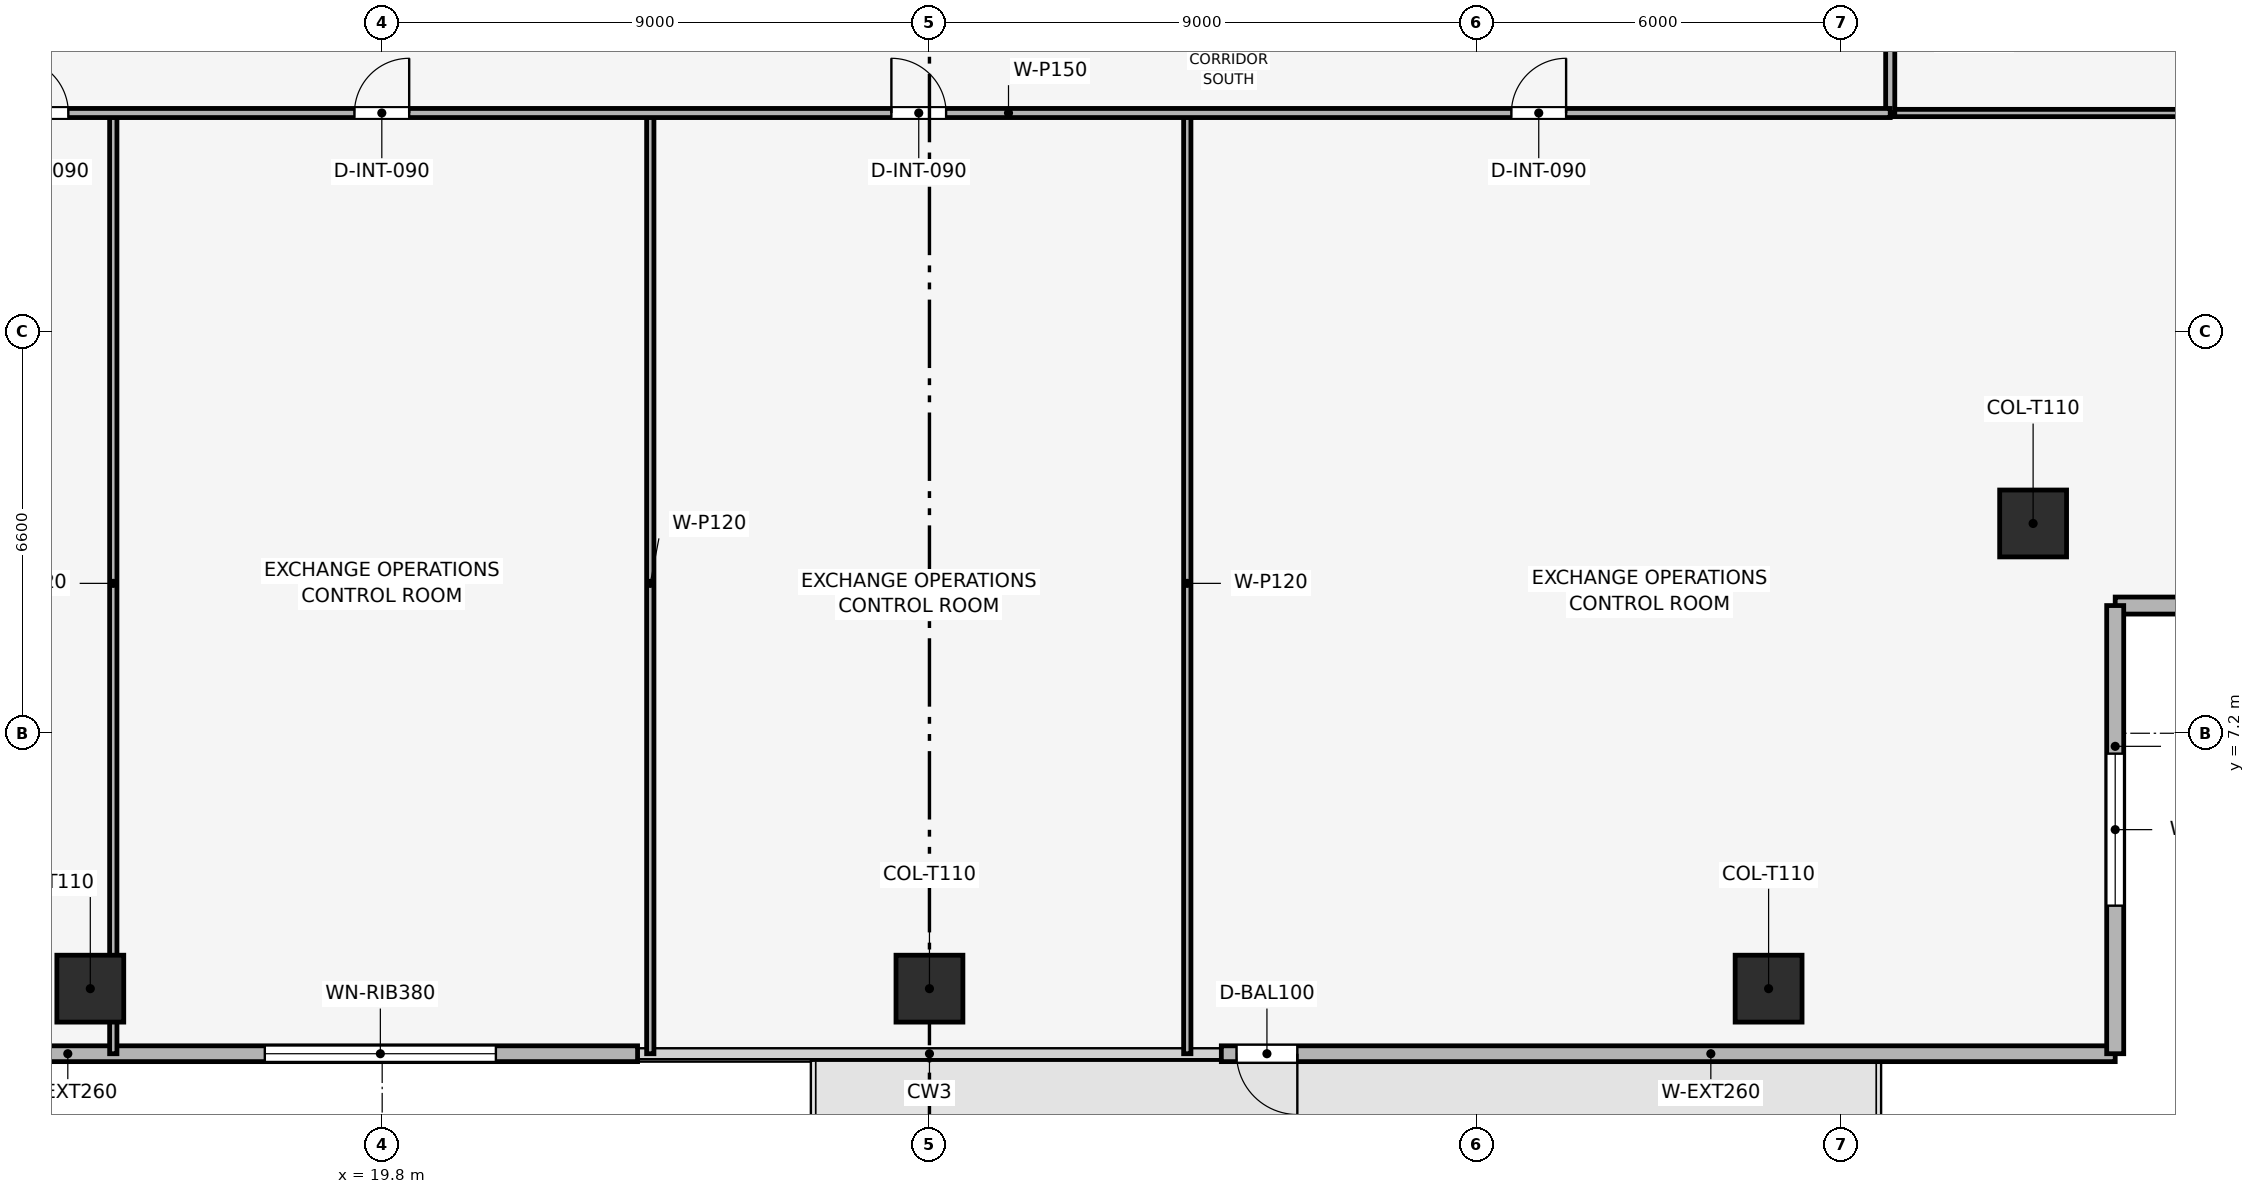
"""IFC4 building model, lengths in metres.
Left out: names, types, materials, properties, quantities, classifications, styles, units other than length and angle.
Written with IfcOpenShell. Run it as: python <this file> out.ifc"""

import sys

from ifc_helpers import new_model, si_unit, direction, frame, frame_2d, origin, origin_2d, place, context, subcontext, project, spatial, rectangle, extrude, element, fill, save


model = new_model("IFC4")
c1 = context("Model", 3, precision=1e-05, world=origin(), true_north=direction((0.0, 1.0)))
c2 = subcontext(c1, "Body", "Model", "MODEL_VIEW")
j1 = project(units=[si_unit("LENGTHUNIT", "METRE"), si_unit("PLANEANGLEUNIT", "RADIAN")], contexts=[c1])
p1 = place(None, origin())
s1 = spatial("IfcSite", under=j1, at=p1, CompositionType="ELEMENT")
p2 = place(p1, origin())
s2 = spatial("IfcBuilding", under=s1, at=p2, CompositionType="ELEMENT")
p3 = place(p2, frame((0.0, 0.0, 203.7)))
s3 = spatial("IfcBuildingStorey", under=s2, at=p3, CompositionType="ELEMENT", Elevation=203.7)
for number, where, z_axis, x_axis in (
    (1, (15.0, 3.0, 0.003), (0.0, 0.0, 1.0), (1.0, 0.0, 0.0)),
    (2, (28.8, 3.0, 0.003), (0.0, 0.0, 1.0), (1.0, 0.0, 0.0)),
    (3, (42.6, 3.0, 0.003), (0.0, 0.0, 1.0), (1.0, 0.0, 0.0)),
    (4, (46.95, 10.65, 0.003), (0.0, 0.0, 1.0), (1.0, 0.0, 0.0)),
):
    element("IfcColumn", number, at=place(p3, frame(where, z_axis=z_axis, x_axis=x_axis)), inside=s3, PredefinedType="COLUMN", context=c2, shape_type="SweptSolid", body=[
        extrude(rectangle(XDim=1.1, YDim=1.1, at=origin_2d()), origin(), (0.0, 0.0, 1.0), 3.494),
    ])
p4 = place(p3, frame((48.3, 1.93, 0.0), z_axis=(0.0, 0.0, 1.0), x_axis=(-1.0, 0.0, 0.0)))
e5 = element("IfcWall", 5, at=p4, inside=s3, PredefinedType="SOLIDWALL", context=c2, shape_type="SweptSolid", body=[
    extrude(rectangle(XDim=14.7, YDim=0.26, at=frame_2d((7.35, 0.0))), origin(), (0.0, 0.0, 1.0), 3.5),
])
p5 = place(p4, frame((13.45, 0.0, 0.0)))
e6 = element("IfcOpeningElement", 6, at=p5, cuts=e5, PredefinedType="OPENING", context=c2, shape_type="SweptSolid", body=[
    extrude(rectangle(XDim=1.0, YDim=2.2, at=frame_2d((0.5, 1.1))), frame((0.0, 0.14, 0.0), z_axis=(0.0, -1.0, 0.0), x_axis=(1.0, 0.0, 0.0)), (0.0, 0.0, 1.0), 0.28),
])
p6 = place(p3, frame((24.0, 1.93, 0.0), z_axis=(0.0, 0.0, 1.0), x_axis=(-1.0, 0.0, 0.0)))
e7 = element("IfcWall", 7, at=p6, inside=s3, PredefinedType="SOLIDWALL", context=c2, shape_type="SweptSolid", body=[
    extrude(rectangle(XDim=14.7, YDim=0.26, at=frame_2d((7.35, 0.0))), origin(), (0.0, 0.0, 1.0), 3.5),
])
p7 = place(p6, frame((2.33, 0.0, 0.9)))
e8 = element("IfcOpeningElement", 8, at=p7, cuts=e7, PredefinedType="OPENING", context=c2, shape_type="SweptSolid", body=[
    extrude(rectangle(XDim=3.8, YDim=1.9, at=frame_2d((1.9, 0.95))), frame((0.0, 0.14, 0.0), z_axis=(0.0, -1.0, 0.0), x_axis=(1.0, 0.0, 0.0)), (0.0, 0.0, 1.0), 0.28),
])
p8 = place(p3, frame((55.67, 9.3, 0.0), z_axis=(0.0, 0.0, 1.0), x_axis=(-1.0, 0.0, 0.0)))
e9 = element("IfcWall", 9, at=p8, inside=s3, PredefinedType="SOLIDWALL", context=c2, shape_type="SweptSolid", body=[
    extrude(rectangle(XDim=7.37, YDim=0.28, at=frame_2d((3.685, 0.0))), origin(), (0.0, 0.0, 1.0), 3.5),
])
p9 = place(p8, frame((2.435, 0.0, 0.9)))
e10 = element("IfcOpeningElement", 10, at=p9, cuts=e9, PredefinedType="OPENING", context=c2, shape_type="SweptSolid", body=[
    extrude(rectangle(XDim=2.5, YDim=1.9, at=frame_2d((1.25, 0.95))), frame((0.0, 0.15, 0.0), z_axis=(0.0, -1.0, 0.0), x_axis=(1.0, 0.0, 0.0)), (0.0, 0.0, 1.0), 0.3),
])
p10 = place(p3, frame((48.3, 9.3, 0.0), z_axis=(0.0, 0.0, 1.0), x_axis=(0.0, -1.0, 0.0)))
e11 = element("IfcWall", 11, at=p10, inside=s3, PredefinedType="SOLIDWALL", context=c2, shape_type="SweptSolid", body=[
    extrude(rectangle(XDim=7.37, YDim=0.28, at=frame_2d((3.685, 0.0))), origin(), (0.0, 0.0, 1.0), 3.5),
])
p11 = place(p10, frame((2.435, 0.0, 0.9)))
e12 = element("IfcOpeningElement", 12, at=p11, cuts=e11, PredefinedType="OPENING", context=c2, shape_type="SweptSolid", body=[
    extrude(rectangle(XDim=2.5, YDim=1.9, at=frame_2d((1.25, 0.95))), frame((0.0, 0.15, 0.0), z_axis=(0.0, -1.0, 0.0), x_axis=(1.0, 0.0, 0.0)), (0.0, 0.0, 1.0), 0.3),
])
for number, where, z_axis, x_axis in (
    (13, (15.378, 1.93, 0.0), (0.0, 0.0, 1.0), (0.0, 1.0, 0.0)),
    (14, (24.209, 1.93, 0.0), (0.0, 0.0, 1.0), (0.0, 1.0, 0.0)),
    (15, (33.04, 1.93, 0.0), (0.0, 0.0, 1.0), (0.0, 1.0, 0.0)),
):
    element("IfcWall", number, at=place(p3, frame(where, z_axis=z_axis, x_axis=x_axis)), inside=s3, PredefinedType="PARTITIONING", context=c2, shape_type="SweptSolid", body=[
        extrude(rectangle(XDim=15.47, YDim=0.12, at=frame_2d((7.735, 0.0))), origin(), (0.0, 0.0, 1.0), 2.885),
    ])
p12 = place(p3, frame((44.6, 17.4, 0.0), z_axis=(0.0, 0.0, 1.0), x_axis=(1.0, 0.0, 0.0)))
e16 = element("IfcWall", 16, at=p12, inside=s3, PredefinedType="PARTITIONING", context=c2, shape_type="SweptSolid", body=[
    extrude(rectangle(XDim=11.07, YDim=0.12, at=frame_2d((5.535, 0.0))), origin(), (0.0, 0.0, 1.0), 2.885),
])
p13 = place(p3, frame((44.6, 17.4, 0.0), z_axis=(0.0, 0.0, 1.0), x_axis=(0.0, 1.0, 0.0)))
e17 = element("IfcWall", 17, at=p13, inside=s3, PredefinedType="PARTITIONING", context=c2, shape_type="SweptSolid", body=[
    extrude(rectangle(XDim=2.4, YDim=0.15, at=frame_2d((1.2, 0.0))), origin(), (0.0, 0.0, 1.0), 3.5),
])
p14 = place(p3, frame((13.0, 17.4, 0.0), z_axis=(0.0, 0.0, 1.0), x_axis=(1.0, 0.0, 0.0)))
e18 = element("IfcWall", 18, at=p14, inside=s3, PredefinedType="PARTITIONING", context=c2, shape_type="SweptSolid", body=[
    extrude(rectangle(XDim=31.6, YDim=0.15, at=frame_2d((15.8, 0.0))), origin(), (0.0, 0.0, 1.0), 3.035),
])
p15 = place(p14, frame((0.739, 0.0, 0.0)))
e19 = element("IfcOpeningElement", 19, at=p15, cuts=e18, PredefinedType="OPENING", context=c2, shape_type="SweptSolid", body=[
    extrude(rectangle(XDim=0.9, YDim=2.1, at=frame_2d((0.45, 1.05))), frame((0.0, 0.085, 0.0), z_axis=(0.0, -1.0, 0.0), x_axis=(1.0, 0.0, 0.0)), (0.0, 0.0, 1.0), 0.17),
])
p16 = place(p14, frame((6.344, 0.0, 0.0)))
e20 = element("IfcOpeningElement", 20, at=p16, cuts=e18, PredefinedType="OPENING", context=c2, shape_type="SweptSolid", body=[
    extrude(rectangle(XDim=0.9, YDim=2.1, at=frame_2d((0.45, 1.05))), frame((0.0, 0.085, 0.0), z_axis=(0.0, -1.0, 0.0), x_axis=(1.0, 0.0, 0.0)), (0.0, 0.0, 1.0), 0.17),
])
p17 = place(p14, frame((15.174, 0.0, 0.0)))
e21 = element("IfcOpeningElement", 21, at=p17, cuts=e18, PredefinedType="OPENING", context=c2, shape_type="SweptSolid", body=[
    extrude(rectangle(XDim=0.9, YDim=2.1, at=frame_2d((0.45, 1.05))), frame((0.0, 0.085, 0.0), z_axis=(0.0, -1.0, 0.0), x_axis=(1.0, 0.0, 0.0)), (0.0, 0.0, 1.0), 0.17),
])
p18 = place(p14, frame((25.37, 0.0, 0.0)))
e22 = element("IfcOpeningElement", 22, at=p18, cuts=e18, PredefinedType="OPENING", context=c2, shape_type="SweptSolid", body=[
    extrude(rectangle(XDim=0.9, YDim=2.1, at=frame_2d((0.45, 1.05))), frame((0.0, 0.085, 0.0), z_axis=(0.0, -1.0, 0.0), x_axis=(1.0, 0.0, 0.0)), (0.0, 0.0, 1.0), 0.17),
])
p19 = place(p5, origin())
e23 = element("IfcDoor", 23, at=p19, inside=s3, OperationType="SINGLE_SWING_LEFT", PredefinedType="DOOR", context=c2, shape_type="SweptSolid", body=[
    extrude(rectangle(XDim=1.0, YDim=2.2, at=frame_2d((0.5, 1.1))), frame((0.0, 0.025, 0.0), z_axis=(0.0, -1.0, 0.0), x_axis=(1.0, 0.0, 0.0)), (0.0, 0.0, 1.0), 0.05),
])
fill(e6, e23)
p20 = place(p7, origin())
e24 = element("IfcWindow", 24, at=p20, inside=s3, PartitioningType="SINGLE_PANEL", PredefinedType="WINDOW", context=c2, shape_type="SweptSolid", body=[
    extrude(rectangle(XDim=3.8, YDim=1.9, at=frame_2d((1.9, 0.95))), frame((0.0, 0.03, 0.0), z_axis=(0.0, -1.0, 0.0), x_axis=(1.0, 0.0, 0.0)), (0.0, 0.0, 1.0), 0.06),
])
fill(e8, e24)
p21 = place(p11, origin())
e25 = element("IfcWindow", 25, at=p21, inside=s3, PartitioningType="SINGLE_PANEL", PredefinedType="WINDOW", context=c2, shape_type="SweptSolid", body=[
    extrude(rectangle(XDim=2.5, YDim=1.9, at=frame_2d((1.25, 0.95))), frame((0.0, 0.03, 0.0), z_axis=(0.0, -1.0, 0.0), x_axis=(1.0, 0.0, 0.0)), (0.0, 0.0, 1.0), 0.06),
])
fill(e12, e25)
p22 = place(p15, origin())
e26 = element("IfcDoor", 26, at=p22, inside=s3, OperationType="SINGLE_SWING_LEFT", PredefinedType="DOOR", context=c2, shape_type="SweptSolid", body=[
    extrude(rectangle(XDim=0.9, YDim=2.1, at=frame_2d((0.45, 1.05))), frame((0.0, 0.025, 0.0), z_axis=(0.0, -1.0, 0.0), x_axis=(1.0, 0.0, 0.0)), (0.0, 0.0, 1.0), 0.05),
])
fill(e19, e26)
p23 = place(p16, origin())
e27 = element("IfcDoor", 27, at=p23, inside=s3, OperationType="SINGLE_SWING_RIGHT", PredefinedType="DOOR", context=c2, shape_type="SweptSolid", body=[
    extrude(rectangle(XDim=0.9, YDim=2.1, at=frame_2d((0.45, 1.05))), frame((0.0, 0.025, 0.0), z_axis=(0.0, -1.0, 0.0), x_axis=(1.0, 0.0, 0.0)), (0.0, 0.0, 1.0), 0.05),
])
fill(e20, e27)
p24 = place(p17, origin())
e28 = element("IfcDoor", 28, at=p24, inside=s3, OperationType="SINGLE_SWING_LEFT", PredefinedType="DOOR", context=c2, shape_type="SweptSolid", body=[
    extrude(rectangle(XDim=0.9, YDim=2.1, at=frame_2d((0.45, 1.05))), frame((0.0, 0.025, 0.0), z_axis=(0.0, -1.0, 0.0), x_axis=(1.0, 0.0, 0.0)), (0.0, 0.0, 1.0), 0.05),
])
fill(e21, e28)
p25 = place(p18, origin())
e29 = element("IfcDoor", 29, at=p25, inside=s3, OperationType="SINGLE_SWING_RIGHT", PredefinedType="DOOR", context=c2, shape_type="SweptSolid", body=[
    extrude(rectangle(XDim=0.9, YDim=2.1, at=frame_2d((0.45, 1.05))), frame((0.0, 0.025, 0.0), z_axis=(0.0, -1.0, 0.0), x_axis=(1.0, 0.0, 0.0)), (0.0, 0.0, 1.0), 0.05),
])
fill(e22, e29)
save(model, sys.argv[1])
